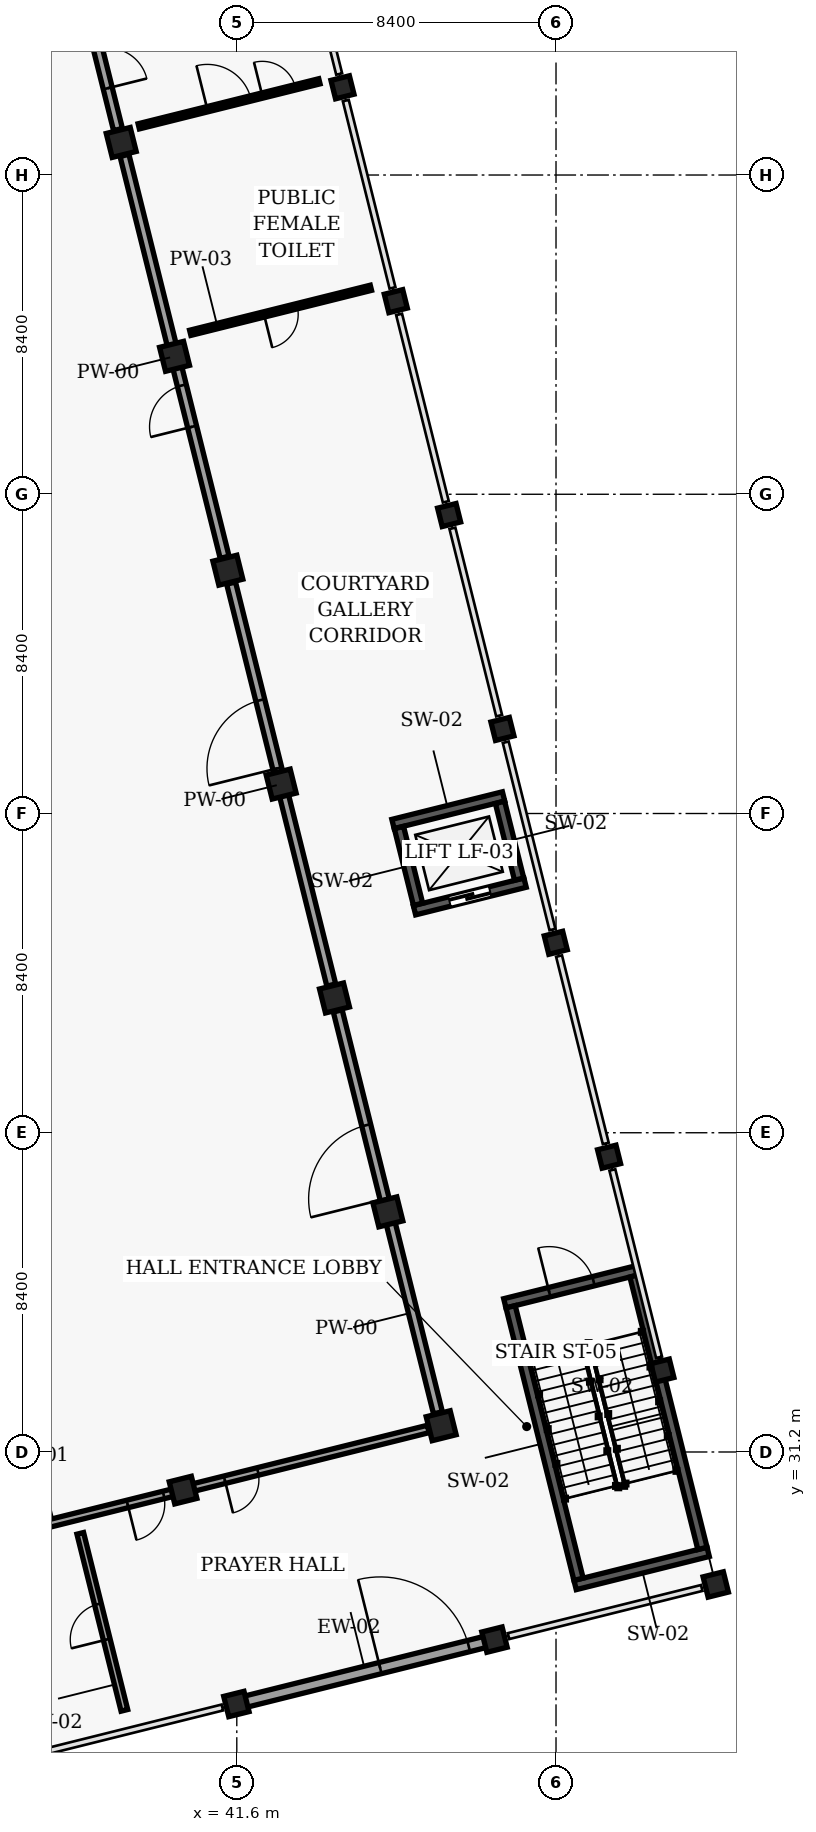
"""IFC4 building model, lengths in metres.
Left out: names, types, materials, properties, quantities, classifications, styles, units other than length and angle.
Written with IfcOpenShell. Run it as: python <this file> out.ifc"""

import sys

from ifc_helpers import new_model, si_unit, direction, frame, frame_2d, origin, origin_2d, place, context, subcontext, project, spatial, rectangle, extrude, element, fill, save


model = new_model("IFC4")
c1 = context("Model", 3, precision=1e-05, world=origin(), true_north=direction((0.0, 1.0)))
c2 = subcontext(c1, "Body", "Model", "MODEL_VIEW")
j1 = project(units=[si_unit("LENGTHUNIT", "METRE"), si_unit("PLANEANGLEUNIT", "RADIAN")], contexts=[c1])
p1 = place(None, origin())
s1 = spatial("IfcSite", under=j1, at=p1, CompositionType="ELEMENT")
p2 = place(p1, origin())
s2 = spatial("IfcBuilding", under=s1, at=p2, CompositionType="ELEMENT")
p3 = place(p2, origin())
s3 = spatial("IfcBuildingStorey", under=s2, at=p3, CompositionType="ELEMENT", Elevation=0.0)
for number, where, z_axis, x_axis in (
    (1, (46.978, 31.891, 0.0), (0.0, 0.0, 1.0), (0.97, 0.242, 0.0)),
    (2, (45.575, 37.518, 0.0), (0.0, 0.0, 1.0), (0.97, 0.242, 0.0)),
    (3, (44.171, 43.146, 0.0), (0.0, 0.0, 1.0), (0.97, 0.242, 0.0)),
    (4, (42.768, 48.774, 0.0), (0.0, 0.0, 1.0), (0.97, 0.242, 0.0)),
    (5, (41.365, 54.402, 0.0), (0.0, 0.0, 1.0), (0.97, 0.242, 0.0)),
    (6, (39.962, 60.029, 0.0), (0.0, 0.0, 1.0), (0.97, 0.242, 0.0)),
    (7, (38.559, 65.657, 0.0), (0.0, 0.0, 1.0), (0.97, 0.242, 0.0)),
):
    element("IfcColumn", number, at=place(p3, frame(where, z_axis=z_axis, x_axis=x_axis)), inside=s3, PredefinedType="COLUMN", context=c2, shape_type="SweptSolid", body=[
        extrude(rectangle(XDim=0.65, YDim=0.65, at=origin_2d()), origin(), (0.0, 0.0, 1.0), 4.8),
    ])
for number, where, z_axis, x_axis in (
    (8, (52.799, 33.342, 0.0), (0.0, 0.0, 1.0), (0.97, 0.242, 0.0)),
    (9, (51.396, 38.97, 0.0), (0.0, 0.0, 1.0), (0.97, 0.242, 0.0)),
    (10, (49.993, 44.598, 0.0), (0.0, 0.0, 1.0), (0.97, 0.242, 0.0)),
    (11, (48.59, 50.225, 0.0), (0.0, 0.0, 1.0), (0.97, 0.242, 0.0)),
    (12, (47.187, 55.853, 0.0), (0.0, 0.0, 1.0), (0.97, 0.242, 0.0)),
    (13, (45.784, 61.481, 0.0), (0.0, 0.0, 1.0), (0.97, 0.242, 0.0)),
    (14, (44.381, 67.108, 0.0), (0.0, 0.0, 1.0), (0.97, 0.242, 0.0)),
):
    element("IfcColumn", number, at=place(p3, frame(where, z_axis=z_axis, x_axis=x_axis)), inside=s3, PredefinedType="COLUMN", context=c2, shape_type="SweptSolid", body=[
        extrude(rectangle(XDim=0.5, YDim=0.5, at=origin_2d()), origin(), (0.0, 0.0, 1.0), 4.8),
    ])
for number, where, z_axis, x_axis in (
    (15, (41.589, 24.569, 0.0), (0.0, 0.0, 1.0), (0.97, 0.242, 0.0)),
    (16, (48.381, 26.263, 0.0), (0.0, 0.0, 1.0), (0.97, 0.242, 0.0)),
    (17, (54.203, 27.714, 0.0), (0.0, 0.0, 1.0), (0.97, 0.242, 0.0)),
):
    element("IfcColumn", number, at=place(p3, frame(where, z_axis=z_axis, x_axis=x_axis)), inside=s3, PredefinedType="COLUMN", context=c2, shape_type="SweptSolid", body=[
        extrude(rectangle(XDim=0.55, YDim=0.55, at=origin_2d()), origin(), (0.0, 0.0, 1.0), 4.8),
    ])
p4 = place(p3, frame((40.186, 30.197, 0.0), z_axis=(0.0, 0.0, 1.0), x_axis=(0.970295726276, 0.2419218956, 0.0)))
e18 = element("IfcColumn", 18, at=p4, inside=s3, PredefinedType="COLUMN", context=c2, shape_type="SweptSolid", body=[
    extrude(rectangle(XDim=0.6, YDim=0.6, at=origin_2d()), origin(), (0.0, 0.0, 1.0), 4.8),
])
p5 = place(p3, frame((41.686, 24.594, 0.0), z_axis=(0.0, 0.0, 1.0), x_axis=(0.970296478685, 0.241918877831, 0.0)))
e19 = element("IfcWall", 19, at=p5, inside=s3, PredefinedType="SOLIDWALL", context=c2, shape_type="SweptSolid", body=[
    extrude(rectangle(XDim=6.8, YDim=0.3, at=frame_2d((3.4, 0.0))), origin(), (0.0, 0.0, 1.0), 4.065),
])
p6 = place(p5, frame((3.8, 0.0, 0.0)))
e20 = element("IfcOpeningElement", 20, at=p6, cuts=e19, PredefinedType="OPENING", context=c2, shape_type="SweptSolid", body=[
    extrude(rectangle(XDim=2.4, YDim=2.4, at=frame_2d((1.2, 1.2))), frame((0.0, 0.16, 0.0), z_axis=(0.0, -1.0, 0.0), x_axis=(1.0, 0.0, 0.0)), (0.0, 0.0, 1.0), 0.32),
])
p7 = place(p3, frame((48.653, 35.112, 0.0), z_axis=(0.0, 0.0, 1.0), x_axis=(0.97025377679, 0.242090083699, 0.0)))
e21 = element("IfcWall", 21, at=p7, inside=s3, PredefinedType="SHEAR", context=c2, shape_type="SweptSolid", body=[
    extrude(rectangle(XDim=3.61, YDim=0.25, at=frame_2d((1.805, 0.0))), origin(), (0.0, 0.0, 1.0), 4.56),
])
p8 = place(p7, frame((1.205, 0.0, 0.0)))
e22 = element("IfcOpeningElement", 22, at=p8, cuts=e21, PredefinedType="OPENING", context=c2, shape_type="SweptSolid", body=[
    extrude(rectangle(XDim=1.2, YDim=2.15, at=frame_2d((0.6, 1.075))), frame((0.0, 0.135, 0.0), z_axis=(0.0, -1.0, 0.0), x_axis=(1.0, 0.0, 0.0)), (0.0, 0.0, 1.0), 0.27),
])
p9 = place(p3, frame((54.004, 28.572, 0.0), z_axis=(0.0, 0.0, 1.0), x_axis=(-0.970301456204, -0.241898912952, 0.0)))
e23 = element("IfcWall", 23, at=p9, inside=s3, PredefinedType="SHEAR", context=c2, shape_type="SweptSolid", body=[
    extrude(rectangle(XDim=3.609, YDim=0.25, at=frame_2d((1.805, 0.0))), origin(), (0.0, 0.0, 1.0), 4.56),
])
p10 = place(p3, frame((52.065, 35.834, 0.0), z_axis=(0.0, 0.0, 1.0), x_axis=(0.241944845077, -0.97029000404, 0.0)))
e24 = element("IfcWall", 24, at=p10, inside=s3, PredefinedType="SHEAR", context=c2, shape_type="SweptSolid", body=[
    extrude(rectangle(XDim=7.39, YDim=0.25, at=frame_2d((3.695, 0.0))), origin(), (0.0, 0.0, 1.0), 4.56),
])
p11 = place(p3, frame((50.593, 27.851, 0.0), z_axis=(0.0, 0.0, 1.0), x_axis=(-0.241975869228, 0.970282267544, 0.0)))
e25 = element("IfcWall", 25, at=p11, inside=s3, PredefinedType="SHEAR", context=c2, shape_type="SweptSolid", body=[
    extrude(rectangle(XDim=7.389, YDim=0.25, at=frame_2d((3.695, 0.0))), origin(), (0.0, 0.0, 1.0), 4.56),
])
p12 = place(p3, frame((46.276, 45.454, 0.0), z_axis=(0.0, 0.0, 1.0), x_axis=(0.970276420912, 0.241999312028, 0.0)))
e26 = element("IfcWall", 26, at=p12, inside=s3, PredefinedType="SHEAR", context=c2, shape_type="SweptSolid", body=[
    extrude(rectangle(XDim=2.999, YDim=0.25, at=frame_2d((1.5, 0.0))), origin(), (0.0, 0.0, 1.0), 4.56),
])
p13 = place(p12, frame((0.95, 0.0, 0.0)))
e27 = element("IfcOpeningElement", 27, at=p13, cuts=e26, PredefinedType="OPENING", context=c2, shape_type="SweptSolid", body=[
    extrude(rectangle(XDim=1.1, YDim=2.15, at=frame_2d((0.55, 1.075))), frame((0.0, 0.135, 0.0), z_axis=(0.0, -1.0, 0.0), x_axis=(1.0, 0.0, 0.0)), (0.0, 0.0, 1.0), 0.27),
])
p14 = place(p3, frame((48.62, 48.45, 0.0), z_axis=(0.0, 0.0, 1.0), x_axis=(-0.970276420912, -0.241999312028, 0.0)))
e28 = element("IfcWall", 28, at=p14, inside=s3, PredefinedType="SHEAR", context=c2, shape_type="SweptSolid", body=[
    extrude(rectangle(XDim=2.999, YDim=0.25, at=frame_2d((1.5, 0.0))), origin(), (0.0, 0.0, 1.0), 4.56),
])
p15 = place(p3, frame((49.029, 46.274, 0.0), z_axis=(0.0, 0.0, 1.0), x_axis=(-0.241817773214, 0.970321680969, 0.0)))
e29 = element("IfcWall", 29, at=p15, inside=s3, PredefinedType="SHEAR", context=c2, shape_type="SweptSolid", body=[
    extrude(rectangle(XDim=2.081, YDim=0.25, at=frame_2d((1.041, 0.0))), origin(), (0.0, 0.0, 1.0), 4.56),
])
p16 = place(p3, frame((45.867, 47.63, 0.0), z_axis=(0.0, 0.0, 1.0), x_axis=(0.241845306756, -0.970314818809, 0.0)))
e30 = element("IfcWall", 30, at=p16, inside=s3, PredefinedType="SHEAR", context=c2, shape_type="SweptSolid", body=[
    extrude(rectangle(XDim=2.081, YDim=0.25, at=frame_2d((1.04, 0.0))), origin(), (0.0, 0.0, 1.0), 4.56),
])
p17 = place(p3, frame((46.893, 32.231, 0.0), z_axis=(0.0, 0.0, 1.0), x_axis=(-0.24195052599, 0.970288587469, 0.0)))
e31 = element("IfcWall", 31, at=p17, inside=s3, PredefinedType="PARTITIONING", context=c2, shape_type="SweptSolid", body=[
    extrude(rectangle(XDim=10.899, YDim=0.24, at=frame_2d((5.449, 0.0))), origin(), (0.0, 0.0, 1.0), 3.845),
])
p18 = place(p17, frame((5.799, 0.0, 0.0)))
e32 = element("IfcOpeningElement", 32, at=p18, cuts=e31, PredefinedType="OPENING", context=c2, shape_type="SweptSolid", body=[
    extrude(rectangle(XDim=2.0, YDim=2.3, at=frame_2d((1.0, 1.15))), frame((0.0, 0.13, 0.0), z_axis=(0.0, -1.0, 0.0), x_axis=(1.0, 0.0, 0.0)), (0.0, 0.0, 1.0), 0.26),
])
p19 = place(p3, frame((44.086, 43.486, 0.0), z_axis=(0.0, 0.0, 1.0), x_axis=(-0.24184513843, 0.970314860763, 0.0)))
e33 = element("IfcWall", 33, at=p19, inside=s3, PredefinedType="PARTITIONING", context=c2, shape_type="SweptSolid", body=[
    extrude(rectangle(XDim=10.899, YDim=0.24, at=frame_2d((5.45, 0.0))), origin(), (0.0, 0.0, 1.0), 4.006),
])
p20 = place(p19, frame((5.875, 0.0, 0.0)))
e34 = element("IfcOpeningElement", 34, at=p20, cuts=e33, PredefinedType="OPENING", context=c2, shape_type="SweptSolid", body=[
    extrude(rectangle(XDim=1.85, YDim=2.22, at=frame_2d((0.925, 1.11))), frame((0.0, 0.13, 0.0), z_axis=(0.0, -1.0, 0.0), x_axis=(1.0, 0.0, 0.0)), (0.0, 0.0, 1.0), 0.26),
])
p21 = place(p3, frame((41.28, 54.742, 0.0), z_axis=(0.0, 0.0, 1.0), x_axis=(-0.241866165603, 0.970309619625, 0.0)))
e35 = element("IfcWall", 35, at=p21, inside=s3, PredefinedType="PARTITIONING", context=c2, shape_type="SweptSolid", body=[
    extrude(rectangle(XDim=10.898, YDim=0.24, at=frame_2d((5.449, 0.0))), origin(), (0.0, 0.0, 1.0), 4.006),
])
p22 = place(p21, frame((3.539, 0.0, 0.0)))
e36 = element("IfcOpeningElement", 36, at=p22, cuts=e35, PredefinedType="OPENING", context=c2, shape_type="SweptSolid", body=[
    extrude(rectangle(XDim=1.12, YDim=2.16, at=frame_2d((0.56, 1.08))), frame((0.0, 0.13, 0.0), z_axis=(0.0, -1.0, 0.0), x_axis=(1.0, 0.0, 0.0)), (0.0, 0.0, 1.0), 0.26),
])
p23 = place(p3, frame((38.474, 65.997, 0.0), z_axis=(0.0, 0.0, 1.0), x_axis=(-0.241825856576, 0.970319666446, 0.0)))
e37 = element("IfcWall", 37, at=p23, inside=s3, PredefinedType="PARTITIONING", context=c2, shape_type="SweptSolid", body=[
    extrude(rectangle(XDim=5.099, YDim=0.24, at=frame_2d((2.55, 0.0))), origin(), (0.0, 0.0, 1.0), 3.845),
])
p24 = place(p23, frame((1.12, 0.0, 0.0)))
e38 = element("IfcOpeningElement", 38, at=p24, cuts=e37, PredefinedType="OPENING", context=c2, shape_type="SweptSolid", body=[
    extrude(rectangle(XDim=1.06, YDim=2.16, at=frame_2d((0.53, 1.08))), frame((0.0, 0.13, 0.0), z_axis=(0.0, -1.0, 0.0), x_axis=(1.0, 0.0, 0.0)), (0.0, 0.0, 1.0), 0.26),
])
p25 = place(p3, frame((26.942, 26.895, 0.0), z_axis=(0.0, 0.0, 1.0), x_axis=(0.970294418067, 0.241927142478, 0.0)))
e39 = element("IfcWall", 39, at=p25, inside=s3, PredefinedType="PARTITIONING", context=c2, shape_type="SweptSolid", body=[
    extrude(rectangle(XDim=20.299, YDim=0.2, at=frame_2d((10.149, 0.0))), origin(), (0.0, 0.0, 1.0), 3.845),
])
p26 = place(p25, frame((7.166, 0.0, 0.0)))
e40 = element("IfcOpeningElement", 40, at=p26, cuts=e39, PredefinedType="OPENING", context=c2, shape_type="SweptSolid", body=[
    extrude(rectangle(XDim=1.0, YDim=2.14, at=frame_2d((0.5, 1.07))), frame((0.0, 0.11, 0.0), z_axis=(0.0, -1.0, 0.0), x_axis=(1.0, 0.0, 0.0)), (0.0, 0.0, 1.0), 0.22),
])
p27 = place(p25, frame((12.143, 0.0, 0.0)))
e41 = element("IfcOpeningElement", 41, at=p27, cuts=e39, PredefinedType="OPENING", context=c2, shape_type="SweptSolid", body=[
    extrude(rectangle(XDim=0.98, YDim=2.12, at=frame_2d((0.49, 1.06))), frame((0.0, 0.11, 0.0), z_axis=(0.0, -1.0, 0.0), x_axis=(1.0, 0.0, 0.0)), (0.0, 0.0, 1.0), 0.22),
])
p28 = place(p25, frame((5.219, 0.0, 0.0)))
e42 = element("IfcOpeningElement", 42, at=p28, cuts=e39, PredefinedType="OPENING", context=c2, shape_type="SweptSolid", body=[
    extrude(rectangle(XDim=0.9, YDim=2.06, at=frame_2d((0.45, 1.03))), frame((0.0, 0.11, 0.0), z_axis=(0.0, -1.0, 0.0), x_axis=(1.0, 0.0, 0.0)), (0.0, 0.0, 1.0), 0.22),
])
p29 = place(p25, frame((14.779, 0.0, 0.0)))
e43 = element("IfcOpeningElement", 43, at=p29, cuts=e39, PredefinedType="OPENING", context=c2, shape_type="SweptSolid", body=[
    extrude(rectangle(XDim=0.9, YDim=2.06, at=frame_2d((0.45, 1.03))), frame((0.0, 0.11, 0.0), z_axis=(0.0, -1.0, 0.0), x_axis=(1.0, 0.0, 0.0)), (0.0, 0.0, 1.0), 0.22),
])
p30 = place(p3, frame((17.119, 66.289, 0.0), z_axis=(0.0, 0.0, 1.0), x_axis=(0.970297233618, 0.241915849902, 0.0)))
e44 = element("IfcWall", 44, at=p30, inside=s3, PredefinedType="PARTITIONING", context=c2, shape_type="SweptSolid", body=[
    extrude(rectangle(XDim=20.3, YDim=0.2, at=frame_2d((10.15, 0.0))), origin(), (0.0, 0.0, 1.0), 3.845),
])
p31 = place(p30, frame((7.192, 0.0, 0.0)))
e45 = element("IfcOpeningElement", 45, at=p31, cuts=e44, PredefinedType="OPENING", context=c2, shape_type="SweptSolid", body=[
    extrude(rectangle(XDim=0.95, YDim=2.12, at=frame_2d((0.475, 1.06))), frame((0.0, 0.11, 0.0), z_axis=(0.0, -1.0, 0.0), x_axis=(1.0, 0.0, 0.0)), (0.0, 0.0, 1.0), 0.22),
])
p32 = place(p30, frame((10.373, 0.0, 0.0)))
e46 = element("IfcOpeningElement", 46, at=p32, cuts=e44, PredefinedType="OPENING", context=c2, shape_type="SweptSolid", body=[
    extrude(rectangle(XDim=0.92, YDim=2.1, at=frame_2d((0.46, 1.05))), frame((0.0, 0.11, 0.0), z_axis=(0.0, -1.0, 0.0), x_axis=(1.0, 0.0, 0.0)), (0.0, 0.0, 1.0), 0.22),
])
p33 = place(p30, frame((5.12, 0.0, 0.0)))
e47 = element("IfcOpeningElement", 47, at=p33, cuts=e44, PredefinedType="OPENING", context=c2, shape_type="SweptSolid", body=[
    extrude(rectangle(XDim=0.9, YDim=2.06, at=frame_2d((0.45, 1.03))), frame((0.0, 0.11, 0.0), z_axis=(0.0, -1.0, 0.0), x_axis=(1.0, 0.0, 0.0)), (0.0, 0.0, 1.0), 0.22),
])
p34 = place(p30, frame((16.03, 0.0, 0.0)))
e48 = element("IfcOpeningElement", 48, at=p34, cuts=e44, PredefinedType="OPENING", context=c2, shape_type="SweptSolid", body=[
    extrude(rectangle(XDim=0.9, YDim=2.06, at=frame_2d((0.45, 1.03))), frame((0.0, 0.11, 0.0), z_axis=(0.0, -1.0, 0.0), x_axis=(1.0, 0.0, 0.0)), (0.0, 0.0, 1.0), 0.22),
])
p35 = place(p3, frame((38.642, 24.402, 0.0), z_axis=(0.0, 0.0, 1.0), x_axis=(-0.241925168697, 0.970294910195, 0.0)))
e49 = element("IfcWall", 49, at=p35, inside=s3, PredefinedType="PARTITIONING", context=c2, shape_type="SweptSolid", body=[
    extrude(rectangle(XDim=4.8, YDim=0.18, at=frame_2d((2.4, 0.0))), origin(), (0.0, 0.0, 1.0), 4.545),
])
p36 = place(p35, frame((1.92, 0.0, 0.0)))
e50 = element("IfcOpeningElement", 50, at=p36, cuts=e49, PredefinedType="OPENING", context=c2, shape_type="SweptSolid", body=[
    extrude(rectangle(XDim=0.96, YDim=2.08, at=frame_2d((0.48, 1.04))), frame((0.0, 0.1, 0.0), z_axis=(0.0, -1.0, 0.0), x_axis=(1.0, 0.0, 0.0)), (0.0, 0.0, 1.0), 0.2),
])
p37 = place(p3, frame((40.375, 60.648, 0.0), z_axis=(0.0, 0.0, 1.0), x_axis=(0.970306426655, 0.241878974681, 0.0)))
e51 = element("IfcWall", 51, at=p37, inside=s3, PredefinedType="PARTITIONING", context=c2, shape_type="SweptSolid", body=[
    extrude(rectangle(XDim=4.899, YDim=0.14, at=frame_2d((2.45, 0.0))), origin(), (0.0, 0.0, 1.0), 4.187),
])
p38 = place(p37, frame((2.0, 0.0, 0.0)))
e52 = element("IfcOpeningElement", 52, at=p38, cuts=e51, PredefinedType="OPENING", context=c2, shape_type="SweptSolid", body=[
    extrude(rectangle(XDim=0.9, YDim=2.06, at=frame_2d((0.45, 1.03))), frame((0.0, 0.08, 0.0), z_axis=(0.0, -1.0, 0.0), x_axis=(1.0, 0.0, 0.0)), (0.0, 0.0, 1.0), 0.16),
])
p39 = place(p3, frame((39.02, 66.081, 0.0), z_axis=(0.0, 0.0, 1.0), x_axis=(0.970306426655, 0.241878974681, 0.0)))
e53 = element("IfcWall", 53, at=p39, inside=s3, PredefinedType="PARTITIONING", context=c2, shape_type="SweptSolid", body=[
    extrude(rectangle(XDim=4.899, YDim=0.14, at=frame_2d((2.45, 0.0))), origin(), (0.0, 0.0, 1.0), 4.187),
])
p40 = place(p39, frame((1.86, 0.0, 0.0)))
e54 = element("IfcOpeningElement", 54, at=p40, cuts=e53, PredefinedType="OPENING", context=c2, shape_type="SweptSolid", body=[
    extrude(rectangle(XDim=1.18, YDim=2.18, at=frame_2d((0.59, 1.09))), frame((0.0, 0.08, 0.0), z_axis=(0.0, -1.0, 0.0), x_axis=(1.0, 0.0, 0.0)), (0.0, 0.0, 1.0), 0.16),
])
p41 = place(p39, frame((3.35, 0.0, 0.0)))
e55 = element("IfcOpeningElement", 55, at=p41, cuts=e53, PredefinedType="OPENING", context=c2, shape_type="SweptSolid", body=[
    extrude(rectangle(XDim=0.9, YDim=2.06, at=frame_2d((0.45, 1.03))), frame((0.0, 0.08, 0.0), z_axis=(0.0, -1.0, 0.0), x_axis=(1.0, 0.0, 0.0)), (0.0, 0.0, 1.0), 0.16),
])
p42 = place(p8, origin())
e56 = element("IfcDoor", 56, at=p42, inside=s3, OperationType="SINGLE_SWING_LEFT", PredefinedType="DOOR", context=c2, shape_type="SweptSolid", body=[
    extrude(rectangle(XDim=1.2, YDim=2.15, at=frame_2d((0.6, 1.075))), frame((0.0, 0.025, 0.0), z_axis=(0.0, -1.0, 0.0), x_axis=(1.0, 0.0, 0.0)), (0.0, 0.0, 1.0), 0.05),
])
fill(e22, e56)
p43 = place(p13, origin())
e57 = element("IfcDoor", 57, at=p43, inside=s3, OperationType="SLIDING_TO_LEFT", PredefinedType="DOOR", context=c2, shape_type="SweptSolid", body=[
    extrude(rectangle(XDim=1.1, YDim=2.15, at=frame_2d((0.55, 1.075))), frame((0.0, 0.025, 0.0), z_axis=(0.0, -1.0, 0.0), x_axis=(1.0, 0.0, 0.0)), (0.0, 0.0, 1.0), 0.05),
])
fill(e27, e57)
p44 = place(p6, origin())
e58 = element("IfcDoor", 58, at=p44, inside=s3, OperationType="DOUBLE_DOOR_SINGLE_SWING", PredefinedType="DOOR", context=c2, shape_type="SweptSolid", body=[
    extrude(rectangle(XDim=2.4, YDim=2.4, at=frame_2d((1.2, 1.2))), frame((0.0, 0.025, 0.0), z_axis=(0.0, -1.0, 0.0), x_axis=(1.0, 0.0, 0.0)), (0.0, 0.0, 1.0), 0.05),
])
fill(e20, e58)
p45 = place(p18, origin())
e59 = element("IfcDoor", 59, at=p45, inside=s3, OperationType="DOUBLE_DOOR_SINGLE_SWING", PredefinedType="DOOR", context=c2, shape_type="SweptSolid", body=[
    extrude(rectangle(XDim=2.0, YDim=2.3, at=frame_2d((1.0, 1.15))), frame((0.0, 0.025, 0.0), z_axis=(0.0, -1.0, 0.0), x_axis=(1.0, 0.0, 0.0)), (0.0, 0.0, 1.0), 0.05),
])
fill(e32, e59)
p46 = place(p20, origin())
e60 = element("IfcDoor", 60, at=p46, inside=s3, OperationType="DOUBLE_DOOR_SINGLE_SWING", PredefinedType="DOOR", context=c2, shape_type="SweptSolid", body=[
    extrude(rectangle(XDim=1.85, YDim=2.22, at=frame_2d((0.925, 1.11))), frame((0.0, 0.025, 0.0), z_axis=(0.0, -1.0, 0.0), x_axis=(1.0, 0.0, 0.0)), (0.0, 0.0, 1.0), 0.05),
])
fill(e34, e60)
p47 = place(p22, origin())
e61 = element("IfcDoor", 61, at=p47, inside=s3, OperationType="SINGLE_SWING_LEFT", PredefinedType="DOOR", context=c2, shape_type="SweptSolid", body=[
    extrude(rectangle(XDim=1.12, YDim=2.16, at=frame_2d((0.56, 1.08))), frame((0.0, 0.025, 0.0), z_axis=(0.0, -1.0, 0.0), x_axis=(1.0, 0.0, 0.0)), (0.0, 0.0, 1.0), 0.05),
])
fill(e36, e61)
p48 = place(p24, origin())
e62 = element("IfcDoor", 62, at=p48, inside=s3, OperationType="SINGLE_SWING_RIGHT", PredefinedType="DOOR", context=c2, shape_type="SweptSolid", body=[
    extrude(rectangle(XDim=1.06, YDim=2.16, at=frame_2d((0.53, 1.08))), frame((0.0, 0.025, 0.0), z_axis=(0.0, -1.0, 0.0), x_axis=(1.0, 0.0, 0.0)), (0.0, 0.0, 1.0), 0.05),
])
fill(e38, e62)
p49 = place(p27, origin())
e63 = element("IfcDoor", 63, at=p49, inside=s3, OperationType="SINGLE_SWING_RIGHT", PredefinedType="DOOR", context=c2, shape_type="SweptSolid", body=[
    extrude(rectangle(XDim=0.98, YDim=2.12, at=frame_2d((0.49, 1.06))), frame((0.0, 0.025, 0.0), z_axis=(0.0, -1.0, 0.0), x_axis=(1.0, 0.0, 0.0)), (0.0, 0.0, 1.0), 0.05),
])
fill(e41, e63)
p50 = place(p36, origin())
e64 = element("IfcDoor", 64, at=p50, inside=s3, OperationType="SINGLE_SWING_LEFT", PredefinedType="DOOR", context=c2, shape_type="SweptSolid", body=[
    extrude(rectangle(XDim=0.96, YDim=2.08, at=frame_2d((0.48, 1.04))), frame((0.0, 0.025, 0.0), z_axis=(0.0, -1.0, 0.0), x_axis=(1.0, 0.0, 0.0)), (0.0, 0.0, 1.0), 0.05),
])
fill(e50, e64)
p51 = place(p38, origin())
e65 = element("IfcDoor", 65, at=p51, inside=s3, OperationType="SINGLE_SWING_RIGHT", PredefinedType="DOOR", context=c2, shape_type="SweptSolid", body=[
    extrude(rectangle(XDim=0.9, YDim=2.06, at=frame_2d((0.45, 1.03))), frame((0.0, 0.025, 0.0), z_axis=(0.0, -1.0, 0.0), x_axis=(1.0, 0.0, 0.0)), (0.0, 0.0, 1.0), 0.05),
])
fill(e52, e65)
p52 = place(p40, origin())
e66 = element("IfcDoor", 66, at=p52, inside=s3, OperationType="SINGLE_SWING_LEFT", PredefinedType="DOOR", context=c2, shape_type="SweptSolid", body=[
    extrude(rectangle(XDim=1.18, YDim=2.18, at=frame_2d((0.59, 1.09))), frame((0.0, 0.025, 0.0), z_axis=(0.0, -1.0, 0.0), x_axis=(1.0, 0.0, 0.0)), (0.0, 0.0, 1.0), 0.05),
])
fill(e54, e66)
p53 = place(p29, origin())
e67 = element("IfcDoor", 67, at=p53, inside=s3, OperationType="SINGLE_SWING_RIGHT", PredefinedType="DOOR", context=c2, shape_type="SweptSolid", body=[
    extrude(rectangle(XDim=0.9, YDim=2.06, at=frame_2d((0.45, 1.03))), frame((0.0, 0.025, 0.0), z_axis=(0.0, -1.0, 0.0), x_axis=(1.0, 0.0, 0.0)), (0.0, 0.0, 1.0), 0.05),
])
fill(e43, e67)
p54 = place(p41, origin())
e68 = element("IfcDoor", 68, at=p54, inside=s3, OperationType="SINGLE_SWING_LEFT", PredefinedType="DOOR", context=c2, shape_type="SweptSolid", body=[
    extrude(rectangle(XDim=0.9, YDim=2.06, at=frame_2d((0.45, 1.03))), frame((0.0, 0.025, 0.0), z_axis=(0.0, -1.0, 0.0), x_axis=(1.0, 0.0, 0.0)), (0.0, 0.0, 1.0), 0.05),
])
fill(e55, e68)
save(model, sys.argv[1])
